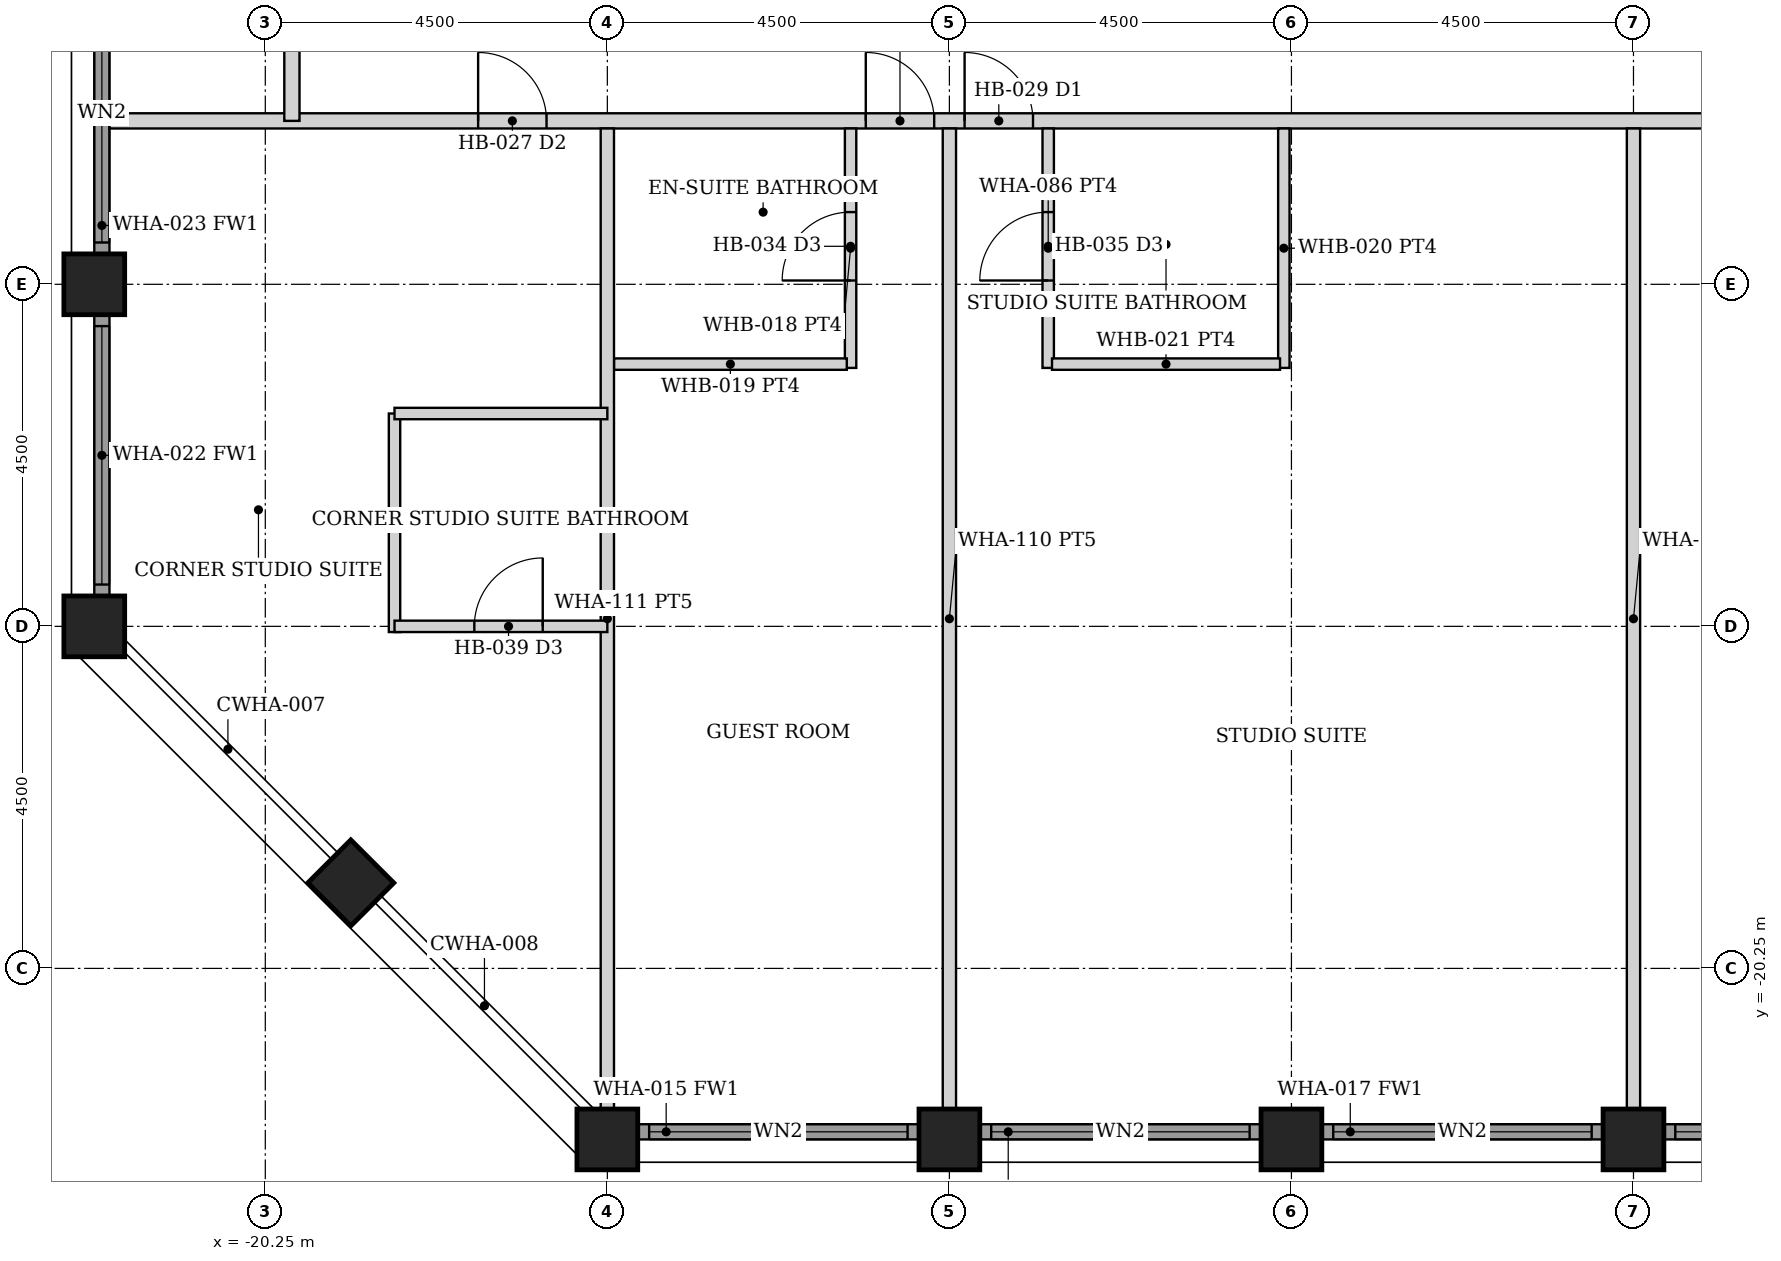
"""IFC4 building model, lengths in metres.
Left out: names, types, materials, properties, quantities, classifications, styles, units other than length and angle.
Written with IfcOpenShell. Run it as: python <this file> out.ifc"""

import sys

from ifc_helpers import new_model, si_unit, direction, frame, frame_2d, origin, origin_2d, place, context, subcontext, project, spatial, rectangle, hollow_rectangle, extrude, element, fill, save


model = new_model("IFC4")
c1 = context("Model", 3, precision=1e-05, world=origin(), true_north=direction((0.0, 1.0)))
c2 = subcontext(c1, "Body", "Model", "MODEL_VIEW")
j1 = project(units=[si_unit("LENGTHUNIT", "METRE"), si_unit("PLANEANGLEUNIT", "RADIAN")], contexts=[c1])
p1 = place(None, origin())
s1 = spatial("IfcSite", under=j1, at=p1, CompositionType="ELEMENT")
p2 = place(p1, origin())
s2 = spatial("IfcBuilding", under=s1, at=p2, CompositionType="ELEMENT")
p3 = place(p2, frame((0.0, 0.0, 129.2)))
s3 = spatial("IfcBuildingStorey", under=s2, at=p3, CompositionType="ELEMENT", Elevation=129.2)
for number, where, z_axis, x_axis in (
    (1, (-15.75, -22.5, 0.0), (0.0, 0.0, 1.0), (0.0, 1.0, 0.0)),
    (2, (-22.5, -15.75, 0.0), (0.0, 0.0, 1.0), (1.0, 0.0, 0.0)),
    (3, (-11.25, -22.5, 0.0), (0.0, 0.0, 1.0), (0.0, 1.0, 0.0)),
    (4, (-22.5, -11.25, 0.0), (0.0, 0.0, 1.0), (1.0, 0.0, 0.0)),
    (5, (-6.75, -22.5, 0.0), (0.0, 0.0, 1.0), (0.0, 1.0, 0.0)),
    (6, (-2.25, -22.5, 0.0), (0.0, 0.0, 1.0), (0.0, 1.0, 0.0)),
    (7, (-19.125, -19.125, 0.0), (0.0, 0.0, 1.0), (0.707, 0.707, 0.0)),
):
    element("IfcColumn", number, at=place(p3, frame(where, z_axis=z_axis, x_axis=x_axis)), inside=s3, PredefinedType="COLUMN", context=c2, shape_type="SweptSolid", body=[
        extrude(hollow_rectangle(XDim=0.8, YDim=0.8, WallThickness=0.06, at=origin_2d()), origin(), (0.0, 0.0, 1.0), 3.6),
    ])
p4 = place(p3, frame((-15.345, -22.4, 0.0), z_axis=(0.0, 0.0, 1.0), x_axis=(1.0, 0.0, 0.0)))
e8 = element("IfcWall", 8, at=p4, inside=s3, PredefinedType="SOLIDWALL", context=c2, shape_type="SweptSolid", body=[
    extrude(rectangle(XDim=3.69, YDim=0.2, at=frame_2d((1.845, 0.0))), origin(), (0.0, 0.0, 1.0), 2.479),
])
p5 = place(p4, frame((0.145, 0.0, 0.3)))
e9 = element("IfcOpeningElement", 9, at=p5, cuts=e8, PredefinedType="OPENING", context=c2, shape_type="SweptSolid", body=[
    extrude(rectangle(XDim=3.4, YDim=2.029, at=frame_2d((1.7, 1.015))), frame((0.0, 0.11, 0.0), z_axis=(0.0, -1.0, 0.0), x_axis=(1.0, 0.0, 0.0)), (0.0, 0.0, 1.0), 0.22),
])
p6 = place(p3, frame((-10.845, -22.4, 0.0), z_axis=(0.0, 0.0, 1.0), x_axis=(1.0, 0.0, 0.0)))
e10 = element("IfcWall", 10, at=p6, inside=s3, PredefinedType="SOLIDWALL", context=c2, shape_type="SweptSolid", body=[
    extrude(rectangle(XDim=3.69, YDim=0.2, at=frame_2d((1.845, 0.0))), origin(), (0.0, 0.0, 1.0), 2.479),
])
p7 = place(p6, frame((0.145, 0.0, 0.3)))
e11 = element("IfcOpeningElement", 11, at=p7, cuts=e10, PredefinedType="OPENING", context=c2, shape_type="SweptSolid", body=[
    extrude(rectangle(XDim=3.4, YDim=2.029, at=frame_2d((1.7, 1.015))), frame((0.0, 0.11, 0.0), z_axis=(0.0, -1.0, 0.0), x_axis=(1.0, 0.0, 0.0)), (0.0, 0.0, 1.0), 0.22),
])
p8 = place(p3, frame((-6.345, -22.4, 0.0), z_axis=(0.0, 0.0, 1.0), x_axis=(1.0, 0.0, 0.0)))
e12 = element("IfcWall", 12, at=p8, inside=s3, PredefinedType="SOLIDWALL", context=c2, shape_type="SweptSolid", body=[
    extrude(rectangle(XDim=3.69, YDim=0.2, at=frame_2d((1.845, 0.0))), origin(), (0.0, 0.0, 1.0), 2.479),
])
p9 = place(p8, frame((0.145, 0.0, 0.3)))
e13 = element("IfcOpeningElement", 13, at=p9, cuts=e12, PredefinedType="OPENING", context=c2, shape_type="SweptSolid", body=[
    extrude(rectangle(XDim=3.4, YDim=2.029, at=frame_2d((1.7, 1.015))), frame((0.0, 0.11, 0.0), z_axis=(0.0, -1.0, 0.0), x_axis=(1.0, 0.0, 0.0)), (0.0, 0.0, 1.0), 0.22),
])
p10 = place(p3, frame((-1.845, -22.4, 0.0), z_axis=(0.0, 0.0, 1.0), x_axis=(1.0, 0.0, 0.0)))
e14 = element("IfcWall", 14, at=p10, inside=s3, PredefinedType="SOLIDWALL", context=c2, shape_type="SweptSolid", body=[
    extrude(rectangle(XDim=3.69, YDim=0.2, at=frame_2d((1.845, 0.0))), origin(), (0.0, 0.0, 1.0), 2.479),
])
p11 = place(p10, frame((0.145, 0.0, 0.3)))
e15 = element("IfcOpeningElement", 15, at=p11, cuts=e14, PredefinedType="OPENING", context=c2, shape_type="SweptSolid", body=[
    extrude(rectangle(XDim=3.4, YDim=2.029, at=frame_2d((1.7, 1.015))), frame((0.0, 0.11, 0.0), z_axis=(0.0, -1.0, 0.0), x_axis=(1.0, 0.0, 0.0)), (0.0, 0.0, 1.0), 0.22),
])
p12 = place(p3, frame((-22.4, -15.345, 0.0), z_axis=(0.0, 0.0, 1.0), x_axis=(0.0, 1.0, 0.0)))
e16 = element("IfcWall", 16, at=p12, inside=s3, PredefinedType="SOLIDWALL", context=c2, shape_type="SweptSolid", body=[
    extrude(rectangle(XDim=3.69, YDim=0.2, at=frame_2d((1.845, 0.0))), origin(), (0.0, 0.0, 1.0), 2.479),
])
p13 = place(p12, frame((0.145, 0.0, 0.3)))
e17 = element("IfcOpeningElement", 17, at=p13, cuts=e16, PredefinedType="OPENING", context=c2, shape_type="SweptSolid", body=[
    extrude(rectangle(XDim=3.4, YDim=2.029, at=frame_2d((1.7, 1.015))), frame((0.0, 0.11, 0.0), z_axis=(0.0, -1.0, 0.0), x_axis=(1.0, 0.0, 0.0)), (0.0, 0.0, 1.0), 0.22),
])
p14 = place(p3, frame((-22.4, -10.845, 0.0), z_axis=(0.0, 0.0, 1.0), x_axis=(0.0, 1.0, 0.0)))
e18 = element("IfcWall", 18, at=p14, inside=s3, PredefinedType="SOLIDWALL", context=c2, shape_type="SweptSolid", body=[
    extrude(rectangle(XDim=3.69, YDim=0.2, at=frame_2d((1.845, 0.0))), origin(), (0.0, 0.0, 1.0), 2.479),
])
p15 = place(p14, frame((0.145, 0.0, 0.3)))
e19 = element("IfcOpeningElement", 19, at=p15, cuts=e18, PredefinedType="OPENING", context=c2, shape_type="SweptSolid", body=[
    extrude(rectangle(XDim=3.4, YDim=2.029, at=frame_2d((1.7, 1.015))), frame((0.0, 0.11, 0.0), z_axis=(0.0, -1.0, 0.0), x_axis=(1.0, 0.0, 0.0)), (0.0, 0.0, 1.0), 0.22),
])
p16 = place(p3, frame((-22.3, -9.1, 0.0), z_axis=(0.0, 0.0, 1.0), x_axis=(1.0, 0.0, 0.0)))
e20 = element("IfcWall", 20, at=p16, inside=s3, PredefinedType="PARTITIONING", context=c2, shape_type="SweptSolid", body=[
    extrude(rectangle(XDim=44.6, YDim=0.2, at=frame_2d((22.3, 0.0))), origin(), (0.0, 0.0, 1.0), 2.473),
])
p17 = place(p16, frame((9.95, 0.0, 0.0)))
e21 = element("IfcOpeningElement", 21, at=p17, cuts=e20, PredefinedType="OPENING", context=c2, shape_type="SweptSolid", body=[
    extrude(rectangle(XDim=0.9, YDim=2.1, at=frame_2d((0.45, 1.05))), frame((0.0, 0.11, 0.0), z_axis=(0.0, -1.0, 0.0), x_axis=(1.0, 0.0, 0.0)), (0.0, 0.0, 1.0), 0.22),
])
p18 = place(p16, frame((11.25, 0.0, 0.0)))
e22 = element("IfcOpeningElement", 22, at=p18, cuts=e20, PredefinedType="OPENING", context=c2, shape_type="SweptSolid", body=[
    extrude(rectangle(XDim=0.9, YDim=2.1, at=frame_2d((0.45, 1.05))), frame((0.0, 0.11, 0.0), z_axis=(0.0, -1.0, 0.0), x_axis=(1.0, 0.0, 0.0)), (0.0, 0.0, 1.0), 0.22),
])
p19 = place(p16, frame((27.95, 0.0, 0.0)))
e23 = element("IfcOpeningElement", 23, at=p19, cuts=e20, PredefinedType="OPENING", context=c2, shape_type="SweptSolid", body=[
    extrude(rectangle(XDim=0.9, YDim=2.1, at=frame_2d((0.45, 1.05))), frame((0.0, 0.11, 0.0), z_axis=(0.0, -1.0, 0.0), x_axis=(1.0, 0.0, 0.0)), (0.0, 0.0, 1.0), 0.22),
])
p20 = place(p16, frame((29.25, 0.0, 0.0)))
e24 = element("IfcOpeningElement", 24, at=p20, cuts=e20, PredefinedType="OPENING", context=c2, shape_type="SweptSolid", body=[
    extrude(rectangle(XDim=0.9, YDim=2.1, at=frame_2d((0.45, 1.05))), frame((0.0, 0.11, 0.0), z_axis=(0.0, -1.0, 0.0), x_axis=(1.0, 0.0, 0.0)), (0.0, 0.0, 1.0), 0.22),
])
p21 = place(p16, frame((36.95, 0.0, 0.0)))
e25 = element("IfcOpeningElement", 25, at=p21, cuts=e20, PredefinedType="OPENING", context=c2, shape_type="SweptSolid", body=[
    extrude(rectangle(XDim=0.9, YDim=2.1, at=frame_2d((0.45, 1.05))), frame((0.0, 0.11, 0.0), z_axis=(0.0, -1.0, 0.0), x_axis=(1.0, 0.0, 0.0)), (0.0, 0.0, 1.0), 0.22),
])
p22 = place(p16, frame((38.85, 0.0, 0.0)))
e26 = element("IfcOpeningElement", 26, at=p22, cuts=e20, PredefinedType="OPENING", context=c2, shape_type="SweptSolid", body=[
    extrude(rectangle(XDim=0.9, YDim=2.1, at=frame_2d((0.45, 1.05))), frame((0.0, 0.11, 0.0), z_axis=(0.0, -1.0, 0.0), x_axis=(1.0, 0.0, 0.0)), (0.0, 0.0, 1.0), 0.22),
])
p23 = place(p16, frame((4.85, 0.0, 0.0)))
e27 = element("IfcOpeningElement", 27, at=p23, cuts=e20, PredefinedType="OPENING", context=c2, shape_type="SweptSolid", body=[
    extrude(rectangle(XDim=0.9, YDim=2.1, at=frame_2d((0.45, 1.05))), frame((0.0, 0.11, 0.0), z_axis=(0.0, -1.0, 0.0), x_axis=(1.0, 0.0, 0.0)), (0.0, 0.0, 1.0), 0.22),
])
p24 = place(p3, frame((-19.9, -9.1, 0.0), z_axis=(0.0, 0.0, 1.0), x_axis=(0.0, 1.0, 0.0)))
e28 = element("IfcWall", 28, at=p24, inside=s3, PredefinedType="PARTITIONING", context=c2, shape_type="SweptSolid", body=[
    extrude(rectangle(XDim=18.2, YDim=0.2, at=frame_2d((9.1, 0.0))), origin(), (0.0, 0.0, 1.0), 2.473),
])
p25 = place(p24, frame((8.425, 0.0, 0.0)))
e29 = element("IfcOpeningElement", 29, at=p25, cuts=e28, PredefinedType="OPENING", context=c2, shape_type="SweptSolid", body=[
    extrude(rectangle(XDim=1.35, YDim=2.1, at=frame_2d((0.675, 1.05))), frame((0.0, 0.11, 0.0), z_axis=(0.0, -1.0, 0.0), x_axis=(1.0, 0.0, 0.0)), (0.0, 0.0, 1.0), 0.22),
])
p26 = place(p3, frame((-12.55, -12.35, 0.0), z_axis=(0.0, 0.0, 1.0), x_axis=(0.0, 1.0, 0.0)))
e30 = element("IfcWall", 30, at=p26, inside=s3, PredefinedType="PARTITIONING", context=c2, shape_type="SweptSolid", body=[
    extrude(rectangle(XDim=3.15, YDim=0.15, at=frame_2d((1.575, 0.0))), origin(), (0.0, 0.0, 1.0), 2.473),
])
p27 = place(p26, frame((1.15, 0.0, 0.0)))
e31 = element("IfcOpeningElement", 31, at=p27, cuts=e30, PredefinedType="OPENING", context=c2, shape_type="SweptSolid", body=[
    extrude(rectangle(XDim=0.9, YDim=2.1, at=frame_2d((0.45, 1.05))), frame((0.0, 0.085, 0.0), z_axis=(0.0, -1.0, 0.0), x_axis=(1.0, 0.0, 0.0)), (0.0, 0.0, 1.0), 0.17),
])
p28 = place(p3, frame((-15.663, -12.3, 0.0), z_axis=(0.0, 0.0, 1.0), x_axis=(1.0, 0.0, 0.0)))
e32 = element("IfcWall", 32, at=p28, inside=s3, PredefinedType="PARTITIONING", context=c2, shape_type="SweptSolid", body=[
    extrude(rectangle(XDim=3.062, YDim=0.15, at=frame_2d((1.531, 0.0))), origin(), (0.0, 0.0, 1.0), 2.473),
])
p29 = place(p3, frame((-9.95, -12.35, 0.0), z_axis=(0.0, 0.0, 1.0), x_axis=(0.0, 1.0, 0.0)))
e33 = element("IfcWall", 33, at=p29, inside=s3, PredefinedType="PARTITIONING", context=c2, shape_type="SweptSolid", body=[
    extrude(rectangle(XDim=3.15, YDim=0.15, at=frame_2d((1.575, 0.0))), origin(), (0.0, 0.0, 1.0), 2.473),
])
p30 = place(p29, frame((1.15, 0.0, 0.0)))
e34 = element("IfcOpeningElement", 34, at=p30, cuts=e33, PredefinedType="OPENING", context=c2, shape_type="SweptSolid", body=[
    extrude(rectangle(XDim=0.9, YDim=2.1, at=frame_2d((0.45, 1.05))), frame((0.0, 0.085, 0.0), z_axis=(0.0, -1.0, 0.0), x_axis=(1.0, 0.0, 0.0)), (0.0, 0.0, 1.0), 0.17),
])
p31 = place(p3, frame((-6.85, -12.35, 0.0), z_axis=(0.0, 0.0, 1.0), x_axis=(0.0, 1.0, 0.0)))
e35 = element("IfcWall", 35, at=p31, inside=s3, PredefinedType="PARTITIONING", context=c2, shape_type="SweptSolid", body=[
    extrude(rectangle(XDim=3.15, YDim=0.15, at=frame_2d((1.575, 0.0))), origin(), (0.0, 0.0, 1.0), 2.473),
])
p32 = place(p3, frame((-9.9, -12.3, 0.0), z_axis=(0.0, 0.0, 1.0), x_axis=(1.0, 0.0, 0.0)))
e36 = element("IfcWall", 36, at=p32, inside=s3, PredefinedType="PARTITIONING", context=c2, shape_type="SweptSolid", body=[
    extrude(rectangle(XDim=3.0, YDim=0.15, at=frame_2d((1.5, 0.0))), origin(), (0.0, 0.0, 1.0), 2.473),
])
for number, where, z_axis, x_axis in (
    (37, (-15.75, -22.1, 0.0), (0.0, 0.0, 1.0), (0.0, 1.0, 0.0)),
    (38, (-11.25, -22.1, 0.0), (0.0, 0.0, 1.0), (0.0, 1.0, 0.0)),
    (39, (-2.25, -22.1, 0.0), (0.0, 0.0, 1.0), (0.0, 1.0, 0.0)),
):
    element("IfcWall", number, at=place(p3, frame(where, z_axis=z_axis, x_axis=x_axis)), inside=s3, PredefinedType="PARTITIONING", context=c2, shape_type="SweptSolid", body=[
        extrude(rectangle(XDim=12.9, YDim=0.175, at=frame_2d((6.45, 0.0))), origin(), (0.0, 0.0, 1.0), 2.473),
    ])
p33 = place(p3, frame((-18.55, -15.825, 0.0), z_axis=(0.0, 0.0, 1.0), x_axis=(0.0, 1.0, 0.0)))
e40 = element("IfcWall", 40, at=p33, inside=s3, PredefinedType="PARTITIONING", context=c2, shape_type="SweptSolid", body=[
    extrude(rectangle(XDim=2.875, YDim=0.15, at=frame_2d((1.438, 0.0))), origin(), (0.0, 0.0, 1.0), 2.473),
])
p34 = place(p3, frame((-18.55, -12.95, 0.0), z_axis=(0.0, 0.0, 1.0), x_axis=(1.0, 0.0, 0.0)))
e41 = element("IfcWall", 41, at=p34, inside=s3, PredefinedType="PARTITIONING", context=c2, shape_type="SweptSolid", body=[
    extrude(rectangle(XDim=2.8, YDim=0.15, at=frame_2d((1.4, 0.0))), origin(), (0.0, 0.0, 1.0), 2.473),
])
p35 = place(p3, frame((-18.55, -15.75, 0.0), z_axis=(0.0, 0.0, 1.0), x_axis=(1.0, 0.0, 0.0)))
e42 = element("IfcWall", 42, at=p35, inside=s3, PredefinedType="PARTITIONING", context=c2, shape_type="SweptSolid", body=[
    extrude(rectangle(XDim=2.8, YDim=0.15, at=frame_2d((1.4, 0.0))), origin(), (0.0, 0.0, 1.0), 2.473),
])
p36 = place(p35, frame((1.05, 0.0, 0.0)))
e43 = element("IfcOpeningElement", 43, at=p36, cuts=e42, PredefinedType="OPENING", context=c2, shape_type="SweptSolid", body=[
    extrude(rectangle(XDim=0.9, YDim=2.1, at=frame_2d((0.45, 1.05))), frame((0.0, 0.085, 0.0), z_axis=(0.0, -1.0, 0.0), x_axis=(1.0, 0.0, 0.0)), (0.0, 0.0, 1.0), 0.17),
])
p37 = place(p5, origin())
e44 = element("IfcWindow", 44, at=p37, inside=s3, PartitioningType="SINGLE_PANEL", PredefinedType="WINDOW", context=c2, shape_type="SweptSolid", body=[
    extrude(rectangle(XDim=3.4, YDim=2.029, at=frame_2d((1.7, 1.015))), frame((0.0, 0.03, 0.0), z_axis=(0.0, -1.0, 0.0), x_axis=(1.0, 0.0, 0.0)), (0.0, 0.0, 1.0), 0.06),
])
fill(e9, e44)
p38 = place(p7, origin())
e45 = element("IfcWindow", 45, at=p38, inside=s3, PartitioningType="SINGLE_PANEL", PredefinedType="WINDOW", context=c2, shape_type="SweptSolid", body=[
    extrude(rectangle(XDim=3.4, YDim=2.029, at=frame_2d((1.7, 1.015))), frame((0.0, 0.03, 0.0), z_axis=(0.0, -1.0, 0.0), x_axis=(1.0, 0.0, 0.0)), (0.0, 0.0, 1.0), 0.06),
])
fill(e11, e45)
p39 = place(p9, origin())
e46 = element("IfcWindow", 46, at=p39, inside=s3, PartitioningType="SINGLE_PANEL", PredefinedType="WINDOW", context=c2, shape_type="SweptSolid", body=[
    extrude(rectangle(XDim=3.4, YDim=2.029, at=frame_2d((1.7, 1.015))), frame((0.0, 0.03, 0.0), z_axis=(0.0, -1.0, 0.0), x_axis=(1.0, 0.0, 0.0)), (0.0, 0.0, 1.0), 0.06),
])
fill(e13, e46)
p40 = place(p11, origin())
e47 = element("IfcWindow", 47, at=p40, inside=s3, PartitioningType="SINGLE_PANEL", PredefinedType="WINDOW", context=c2, shape_type="SweptSolid", body=[
    extrude(rectangle(XDim=3.4, YDim=2.029, at=frame_2d((1.7, 1.015))), frame((0.0, 0.03, 0.0), z_axis=(0.0, -1.0, 0.0), x_axis=(1.0, 0.0, 0.0)), (0.0, 0.0, 1.0), 0.06),
])
fill(e15, e47)
p41 = place(p13, origin())
e48 = element("IfcWindow", 48, at=p41, inside=s3, PartitioningType="SINGLE_PANEL", PredefinedType="WINDOW", context=c2, shape_type="SweptSolid", body=[
    extrude(rectangle(XDim=3.4, YDim=2.029, at=frame_2d((1.7, 1.015))), frame((0.0, 0.03, 0.0), z_axis=(0.0, -1.0, 0.0), x_axis=(1.0, 0.0, 0.0)), (0.0, 0.0, 1.0), 0.06),
])
fill(e17, e48)
p42 = place(p15, origin())
e49 = element("IfcWindow", 49, at=p42, inside=s3, PartitioningType="SINGLE_PANEL", PredefinedType="WINDOW", context=c2, shape_type="SweptSolid", body=[
    extrude(rectangle(XDim=3.4, YDim=2.029, at=frame_2d((1.7, 1.015))), frame((0.0, 0.03, 0.0), z_axis=(0.0, -1.0, 0.0), x_axis=(1.0, 0.0, 0.0)), (0.0, 0.0, 1.0), 0.06),
])
fill(e19, e49)
p43 = place(p17, origin())
e50 = element("IfcDoor", 50, at=p43, inside=s3, OperationType="SINGLE_SWING_LEFT", PredefinedType="DOOR", context=c2, shape_type="SweptSolid", body=[
    extrude(rectangle(XDim=0.9, YDim=2.1, at=frame_2d((0.45, 1.05))), frame((0.0, 0.025, 0.0), z_axis=(0.0, -1.0, 0.0), x_axis=(1.0, 0.0, 0.0)), (0.0, 0.0, 1.0), 0.05),
])
fill(e21, e50)
p44 = place(p27, origin())
e51 = element("IfcDoor", 51, at=p44, inside=s3, OperationType="SINGLE_SWING_LEFT", PredefinedType="DOOR", context=c2, shape_type="SweptSolid", body=[
    extrude(rectangle(XDim=0.9, YDim=2.1, at=frame_2d((0.45, 1.05))), frame((0.0, 0.025, 0.0), z_axis=(0.0, -1.0, 0.0), x_axis=(1.0, 0.0, 0.0)), (0.0, 0.0, 1.0), 0.05),
])
fill(e31, e51)
p45 = place(p18, origin())
e52 = element("IfcDoor", 52, at=p45, inside=s3, OperationType="SINGLE_SWING_LEFT", PredefinedType="DOOR", context=c2, shape_type="SweptSolid", body=[
    extrude(rectangle(XDim=0.9, YDim=2.1, at=frame_2d((0.45, 1.05))), frame((0.0, 0.025, 0.0), z_axis=(0.0, -1.0, 0.0), x_axis=(1.0, 0.0, 0.0)), (0.0, 0.0, 1.0), 0.05),
])
fill(e22, e52)
p46 = place(p30, origin())
e53 = element("IfcDoor", 53, at=p46, inside=s3, OperationType="SINGLE_SWING_LEFT", PredefinedType="DOOR", context=c2, shape_type="SweptSolid", body=[
    extrude(rectangle(XDim=0.9, YDim=2.1, at=frame_2d((0.45, 1.05))), frame((0.0, 0.025, 0.0), z_axis=(0.0, -1.0, 0.0), x_axis=(1.0, 0.0, 0.0)), (0.0, 0.0, 1.0), 0.05),
])
fill(e34, e53)
p47 = place(p23, origin())
e54 = element("IfcDoor", 54, at=p47, inside=s3, OperationType="SINGLE_SWING_LEFT", PredefinedType="DOOR", context=c2, shape_type="SweptSolid", body=[
    extrude(rectangle(XDim=0.9, YDim=2.1, at=frame_2d((0.45, 1.05))), frame((0.0, 0.025, 0.0), z_axis=(0.0, -1.0, 0.0), x_axis=(1.0, 0.0, 0.0)), (0.0, 0.0, 1.0), 0.05),
])
fill(e27, e54)
p48 = place(p36, origin())
e55 = element("IfcDoor", 55, at=p48, inside=s3, OperationType="SINGLE_SWING_RIGHT", PredefinedType="DOOR", context=c2, shape_type="SweptSolid", body=[
    extrude(rectangle(XDim=0.9, YDim=2.1, at=frame_2d((0.45, 1.05))), frame((0.0, 0.025, 0.0), z_axis=(0.0, -1.0, 0.0), x_axis=(1.0, 0.0, 0.0)), (0.0, 0.0, 1.0), 0.05),
])
fill(e43, e55)
save(model, sys.argv[1])
